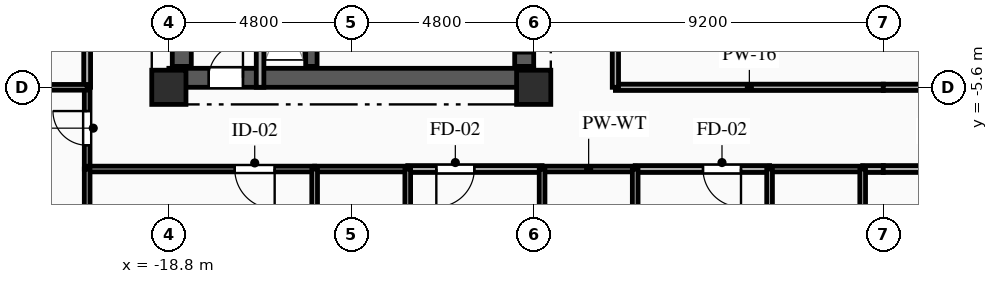
"""IFC4 building model, lengths in metres.
Left out: names, types, materials, properties, quantities, classifications, styles, units other than length and angle.
Written with IfcOpenShell. Run it as: python <this file> out.ifc"""

import sys

from ifc_helpers import new_model, si_unit, direction, frame, frame_2d, origin, origin_2d, place, context, subcontext, project, spatial, rectangle, extrude, element, fill, save


model = new_model("IFC4")
c1 = context("Model", 3, precision=1e-05, world=origin(), true_north=direction((0.0, 1.0)))
c2 = subcontext(c1, "Body", "Model", "MODEL_VIEW")
j1 = project(units=[si_unit("LENGTHUNIT", "METRE"), si_unit("PLANEANGLEUNIT", "RADIAN")], contexts=[c1])
p1 = place(None, origin())
s1 = spatial("IfcSite", under=j1, at=p1, CompositionType="ELEMENT")
p2 = place(p1, origin())
s2 = spatial("IfcBuilding", under=s1, at=p2, CompositionType="ELEMENT")
p3 = place(p2, frame((0.0, 0.0, 154.45)))
s3 = spatial("IfcBuildingStorey", under=s2, at=p3, CompositionType="ELEMENT", Elevation=154.45)
for number, where, z_axis, x_axis in (
    (1, (-18.8, -5.6, 0.0), (0.0, 0.0, 1.0), (1.0, 0.0, 0.0)),
    (2, (-9.2, -5.6, 0.0), (0.0, 0.0, 1.0), (1.0, 0.0, 0.0)),
):
    element("IfcColumn", number, at=place(p3, frame(where, z_axis=z_axis, x_axis=x_axis)), inside=s3, PredefinedType="COLUMN", context=c2, shape_type="SweptSolid", body=[
        extrude(rectangle(XDim=0.9, YDim=0.9, at=origin_2d()), origin(), (0.0, 0.0, 1.0), 3.35),
    ])
p4 = place(p3, frame((-18.8, -5.35, 0.0), z_axis=(0.0, 0.0, 1.0), x_axis=(1.0, 0.0, 0.0)))
e3 = element("IfcWall", 3, at=p4, inside=s3, PredefinedType="SHEAR", context=c2, shape_type="SweptSolid", body=[
    extrude(rectangle(XDim=9.6, YDim=0.5, at=frame_2d((4.8, 0.0))), origin(), (0.0, 0.0, 1.0), 3.04),
])
p5 = place(p4, frame((1.05, 0.0, 0.0)))
e4 = element("IfcOpeningElement", 4, at=p5, cuts=e3, PredefinedType="OPENING", context=c2, shape_type="SweptSolid", body=[
    extrude(rectangle(XDim=0.9, YDim=2.1, at=frame_2d((0.45, 1.05))), frame((0.0, 0.26, 0.0), z_axis=(0.0, -1.0, 0.0), x_axis=(1.0, 0.0, 0.0)), (0.0, 0.0, 1.0), 0.52),
])
p6 = place(p3, frame((-18.46, -5.05, 0.0), z_axis=(0.0, 0.0, 1.0), x_axis=(0.0, 1.0, 0.0)))
e5 = element("IfcWall", 5, at=p6, inside=s3, PredefinedType="SHEAR", context=c2, shape_type="SweptSolid", body=[
    extrude(rectangle(XDim=10.1, YDim=0.5, at=frame_2d((5.05, 0.0))), origin(), (0.0, 0.0, 1.0), 3.04),
])
p7 = place(p3, frame((-9.45, -5.05, 0.0), z_axis=(0.0, 0.0, 1.0), x_axis=(0.0, 1.0, 0.0)))
e6 = element("IfcWall", 6, at=p7, inside=s3, PredefinedType="SHEAR", context=c2, shape_type="SweptSolid", body=[
    extrude(rectangle(XDim=10.1, YDim=0.5, at=frame_2d((5.05, 0.0))), origin(), (0.0, 0.0, 1.0), 3.04),
])
p8 = place(p7, frame((7.15, 0.0, 0.0)))
e7 = element("IfcOpeningElement", 7, at=p8, cuts=e6, PredefinedType="OPENING", context=c2, shape_type="SweptSolid", body=[
    extrude(rectangle(XDim=0.9, YDim=2.1, at=frame_2d((0.45, 1.05))), frame((0.0, 0.26, 0.0), z_axis=(0.0, -1.0, 0.0), x_axis=(1.0, 0.0, 0.0)), (0.0, 0.0, 1.0), 0.52),
])
p9 = place(p7, frame((2.4, 0.0, 0.0)))
e8 = element("IfcOpeningElement", 8, at=p9, cuts=e6, PredefinedType="OPENING", context=c2, shape_type="SweptSolid", body=[
    extrude(rectangle(XDim=1.2, YDim=2.15, at=frame_2d((0.6, 1.075))), frame((0.0, 0.26, 0.0), z_axis=(0.0, -1.0, 0.0), x_axis=(1.0, 0.0, 0.0)), (0.0, 0.0, 1.0), 0.52),
])
p10 = place(p7, frame((0.35, 0.0, 0.0)))
e9 = element("IfcOpeningElement", 9, at=p10, cuts=e6, PredefinedType="OPENING", context=c2, shape_type="SweptSolid", body=[
    extrude(rectangle(XDim=0.9, YDim=2.1, at=frame_2d((0.45, 1.05))), frame((0.0, 0.26, 0.0), z_axis=(0.0, -1.0, 0.0), x_axis=(1.0, 0.0, 0.0)), (0.0, 0.0, 1.0), 0.52),
])
p11 = place(p7, frame((5.0, 0.0, 0.0)))
e10 = element("IfcOpeningElement", 10, at=p11, cuts=e6, PredefinedType="OPENING", context=c2, shape_type="SweptSolid", body=[
    extrude(rectangle(XDim=0.9, YDim=2.1, at=frame_2d((0.45, 1.05))), frame((0.0, 0.26, 0.0), z_axis=(0.0, -1.0, 0.0), x_axis=(1.0, 0.0, 0.0)), (0.0, 0.0, 1.0), 0.52),
])
p12 = place(p3, frame((-15.05, -5.05, 0.0), z_axis=(0.0, 0.0, 1.0), x_axis=(0.0, 1.0, 0.0)))
e11 = element("IfcWall", 11, at=p12, inside=s3, PredefinedType="SHEAR", context=c2, shape_type="SweptSolid", body=[
    extrude(rectangle(XDim=10.1, YDim=0.3, at=frame_2d((5.05, 0.0))), origin(), (0.0, 0.0, 1.0), 3.04),
])
p13 = place(p3, frame((-16.4, -5.6, 0.0), z_axis=(0.0, 0.0, 1.0), x_axis=(0.0, 1.0, 0.0)))
e12 = element("IfcWall", 12, at=p13, inside=s3, PredefinedType="PARTITIONING", context=c2, shape_type="SweptSolid", body=[
    extrude(rectangle(XDim=3.49, YDim=0.2, at=frame_2d((1.745, 0.0))), origin(), (0.0, 0.0, 1.0), 3.04),
])
p14 = place(p3, frame((-20.95, -7.75, 0.0), z_axis=(0.0, 0.0, 1.0), x_axis=(0.0, 1.0, 0.0)))
e13 = element("IfcWall", 13, at=p14, inside=s3, PredefinedType="PARTITIONING", context=c2, shape_type="SweptSolid", body=[
    extrude(rectangle(XDim=2.15, YDim=0.15, at=frame_2d((1.075, 0.0))), origin(), (0.0, 0.0, 1.0), 3.04),
])
p15 = place(p14, frame((0.625, 0.0, 0.0)))
e14 = element("IfcOpeningElement", 14, at=p15, cuts=e13, PredefinedType="OPENING", context=c2, shape_type="SweptSolid", body=[
    extrude(rectangle(XDim=0.9, YDim=2.1, at=frame_2d((0.45, 1.05))), frame((0.0, 0.085, 0.0), z_axis=(0.0, -1.0, 0.0), x_axis=(1.0, 0.0, 0.0)), (0.0, 0.0, 1.0), 0.17),
])
p16 = place(p3, frame((-14.964, -7.75, 0.0), z_axis=(0.0, 0.0, 1.0), x_axis=(-1.0, 0.0, 0.0)))
e15 = element("IfcWall", 15, at=p16, inside=s3, PredefinedType="PARTITIONING", context=c2, shape_type="SweptSolid", body=[
    extrude(rectangle(XDim=5.986, YDim=0.15, at=frame_2d((2.993, 0.0))), origin(), (0.0, 0.0, 1.0), 3.04),
])
p17 = place(p16, frame((1.052, 0.0, 0.0)))
e16 = element("IfcOpeningElement", 16, at=p17, cuts=e15, PredefinedType="OPENING", context=c2, shape_type="SweptSolid", body=[
    extrude(rectangle(XDim=1.05, YDim=2.15, at=frame_2d((0.525, 1.075))), frame((0.0, 0.085, 0.0), z_axis=(0.0, -1.0, 0.0), x_axis=(1.0, 0.0, 0.0)), (0.0, 0.0, 1.0), 0.17),
])
p18 = place(p3, frame((-8.979, -7.75, 0.0), z_axis=(0.0, 0.0, 1.0), x_axis=(-1.0, 0.0, 0.0)))
e17 = element("IfcWall", 17, at=p18, inside=s3, PredefinedType="PARTITIONING", context=c2, shape_type="SweptSolid", body=[
    extrude(rectangle(XDim=3.535, YDim=0.18, at=frame_2d((1.768, 0.0))), origin(), (0.0, 0.0, 1.0), 3.04),
])
p19 = place(p18, frame((1.783, 0.0, 0.0)))
e18 = element("IfcOpeningElement", 18, at=p19, cuts=e17, PredefinedType="OPENING", context=c2, shape_type="SweptSolid", body=[
    extrude(rectangle(XDim=1.0, YDim=2.15, at=frame_2d((0.5, 1.075))), frame((0.0, 0.1, 0.0), z_axis=(0.0, -1.0, 0.0), x_axis=(1.0, 0.0, 0.0)), (0.0, 0.0, 1.0), 0.2),
])
p20 = place(p3, frame((-12.514, -7.75, 0.0), z_axis=(0.0, 0.0, 1.0), x_axis=(-1.0, 0.0, 0.0)))
e19 = element("IfcWall", 19, at=p20, inside=s3, PredefinedType="PLUMBINGWALL", context=c2, shape_type="SweptSolid", body=[
    extrude(rectangle(XDim=2.45, YDim=0.15, at=frame_2d((1.225, 0.0))), origin(), (0.0, 0.0, 1.0), 3.04),
])
p21 = place(p3, frame((-2.993, -7.75, 0.0), z_axis=(0.0, 0.0, 1.0), x_axis=(-1.0, 0.0, 0.0)))
e20 = element("IfcWall", 20, at=p21, inside=s3, PredefinedType="PARTITIONING", context=c2, shape_type="SweptSolid", body=[
    extrude(rectangle(XDim=3.536, YDim=0.18, at=frame_2d((1.768, 0.0))), origin(), (0.0, 0.0, 1.0), 3.04),
])
p22 = place(p21, frame((0.752, 0.0, 0.0)))
e21 = element("IfcOpeningElement", 21, at=p22, cuts=e20, PredefinedType="OPENING", context=c2, shape_type="SweptSolid", body=[
    extrude(rectangle(XDim=1.0, YDim=2.15, at=frame_2d((0.5, 1.075))), frame((0.0, 0.1, 0.0), z_axis=(0.0, -1.0, 0.0), x_axis=(1.0, 0.0, 0.0)), (0.0, 0.0, 1.0), 0.2),
])
p23 = place(p3, frame((-6.529, -7.75, 0.0), z_axis=(0.0, 0.0, 1.0), x_axis=(-1.0, 0.0, 0.0)))
e22 = element("IfcWall", 22, at=p23, inside=s3, PredefinedType="PLUMBINGWALL", context=c2, shape_type="SweptSolid", body=[
    extrude(rectangle(XDim=2.45, YDim=0.15, at=frame_2d((1.225, 0.0))), origin(), (0.0, 0.0, 1.0), 3.04),
])
p24 = place(p3, frame((0.0, -7.75, 0.0), z_axis=(0.0, 0.0, 1.0), x_axis=(-1.0, 0.0, 0.0)))
e23 = element("IfcWall", 23, at=p24, inside=s3, PredefinedType="PARTITIONING", context=c2, shape_type="SweptSolid", body=[
    extrude(rectangle(XDim=0.543, YDim=0.18, at=frame_2d((0.271, 0.0))), origin(), (0.0, 0.0, 1.0), 3.04),
])
p25 = place(p3, frame((-0.543, -7.75, 0.0), z_axis=(0.0, 0.0, 1.0), x_axis=(-1.0, 0.0, 0.0)))
e24 = element("IfcWall", 24, at=p25, inside=s3, PredefinedType="PLUMBINGWALL", context=c2, shape_type="SweptSolid", body=[
    extrude(rectangle(XDim=2.45, YDim=0.15, at=frame_2d((1.225, 0.0))), origin(), (0.0, 0.0, 1.0), 3.04),
])
p26 = place(p3, frame((-7.05, -5.6, 0.0), z_axis=(0.0, 0.0, 1.0), x_axis=(1.0, 0.0, 0.0)))
e25 = element("IfcWall", 25, at=p26, inside=s3, PredefinedType="PARTITIONING", context=c2, shape_type="SweptSolid", body=[
    extrude(rectangle(XDim=7.05, YDim=0.165, at=frame_2d((3.525, 0.0))), origin(), (0.0, 0.0, 1.0), 2.525),
])
p27 = place(p3, frame((2.993, -7.75, 0.0), z_axis=(0.0, 0.0, 1.0), x_axis=(-1.0, 0.0, 0.0)))
e26 = element("IfcWall", 26, at=p27, inside=s3, PredefinedType="PARTITIONING", context=c2, shape_type="SweptSolid", body=[
    extrude(rectangle(XDim=2.993, YDim=0.18, at=frame_2d((1.497, 0.0))), origin(), (0.0, 0.0, 1.0), 3.04),
])
p28 = place(p27, frame((0.892, 0.0, 0.0)))
e27 = element("IfcOpeningElement", 27, at=p28, cuts=e26, PredefinedType="OPENING", context=c2, shape_type="SweptSolid", body=[
    extrude(rectangle(XDim=1.0, YDim=2.15, at=frame_2d((0.5, 1.075))), frame((0.0, 0.1, 0.0), z_axis=(0.0, -1.0, 0.0), x_axis=(1.0, 0.0, 0.0)), (0.0, 0.0, 1.0), 0.2),
])
p29 = place(p3, frame((0.0, -5.6, 0.0), z_axis=(0.0, 0.0, 1.0), x_axis=(1.0, 0.0, 0.0)))
e28 = element("IfcWall", 28, at=p29, inside=s3, PredefinedType="PARTITIONING", context=c2, shape_type="SweptSolid", body=[
    extrude(rectangle(XDim=7.05, YDim=0.165, at=frame_2d((3.525, 0.0))), origin(), (0.0, 0.0, 1.0), 2.525),
])
p30 = place(p3, frame((-20.95, -5.6, 0.0), z_axis=(0.0, 0.0, 1.0), x_axis=(0.0, 1.0, 0.0)))
e29 = element("IfcWall", 29, at=p30, inside=s3, PredefinedType="PARTITIONING", context=c2, shape_type="SweptSolid", body=[
    extrude(rectangle(XDim=14.1, YDim=0.18, at=frame_2d((7.05, 0.0))), origin(), (0.0, 0.0, 1.0), 3.04),
])
p31 = place(p30, frame((5.058, 0.0, 0.0)))
e30 = element("IfcOpeningElement", 30, at=p31, cuts=e29, PredefinedType="OPENING", context=c2, shape_type="SweptSolid", body=[
    extrude(rectangle(XDim=1.0, YDim=2.15, at=frame_2d((0.5, 1.075))), frame((0.0, 0.1, 0.0), z_axis=(0.0, -1.0, 0.0), x_axis=(1.0, 0.0, 0.0)), (0.0, 0.0, 1.0), 0.2),
])
p32 = place(p3, frame((-7.05, -2.95, 0.0), z_axis=(0.0, 0.0, 1.0), x_axis=(0.0, -1.0, 0.0)))
e31 = element("IfcWall", 31, at=p32, inside=s3, PredefinedType="PARTITIONING", context=c2, shape_type="SweptSolid", body=[
    extrude(rectangle(XDim=2.65, YDim=0.165, at=frame_2d((1.325, 0.0))), origin(), (0.0, 0.0, 1.0), 3.04),
])
p33 = place(p3, frame((-20.95, -5.6, 0.0), z_axis=(0.0, 0.0, 1.0), x_axis=(-1.0, 0.0, 0.0)))
e32 = element("IfcWall", 32, at=p33, inside=s3, PredefinedType="PARTITIONING", context=c2, shape_type="SweptSolid", body=[
    extrude(rectangle(XDim=2.65, YDim=0.15, at=frame_2d((1.325, 0.0))), origin(), (0.0, 0.0, 1.0), 3.04),
])
p34 = place(p33, frame((0.965, 0.0, 0.0)))
e33 = element("IfcOpeningElement", 33, at=p34, cuts=e32, PredefinedType="OPENING", context=c2, shape_type="SweptSolid", body=[
    extrude(rectangle(XDim=1.05, YDim=2.15, at=frame_2d((0.525, 1.075))), frame((0.0, 0.085, 0.0), z_axis=(0.0, -1.0, 0.0), x_axis=(1.0, 0.0, 0.0)), (0.0, 0.0, 1.0), 0.17),
])
p35 = place(p3, frame((-20.95, -7.75, 0.0), z_axis=(0.0, 0.0, 1.0), x_axis=(0.0, -1.0, 0.0)))
e34 = element("IfcWall", 34, at=p35, inside=s3, PredefinedType="PARTITIONING", context=c2, shape_type="SweptSolid", body=[
    extrude(rectangle(XDim=7.85, YDim=0.15, at=frame_2d((3.925, 0.0))), origin(), (0.0, 0.0, 1.0), 3.04),
])
for number, where, z_axis, x_axis in (
    (35, (-14.964, -7.75, 0.0), (0.0, 0.0, 1.0), (0.0, -1.0, 0.0)),
    (36, (-12.514, -9.9, 0.0), (0.0, 0.0, 1.0), (0.0, 1.0, 0.0)),
):
    element("IfcWall", number, at=place(p3, frame(where, z_axis=z_axis, x_axis=x_axis)), inside=s3, PredefinedType="PLUMBINGWALL", context=c2, shape_type="SweptSolid", body=[
        extrude(rectangle(XDim=2.15, YDim=0.15, at=frame_2d((1.075, 0.0))), origin(), (0.0, 0.0, 1.0), 3.04),
    ])
p36 = place(p3, frame((-8.979, -7.75, 0.0), z_axis=(0.0, 0.0, 1.0), x_axis=(0.0, -1.0, 0.0)))
e37 = element("IfcWall", 37, at=p36, inside=s3, PredefinedType="PLUMBINGWALL", context=c2, shape_type="SweptSolid", body=[
    extrude(rectangle(XDim=2.15, YDim=0.15, at=frame_2d((1.075, 0.0))), origin(), (0.0, 0.0, 1.0), 2.525),
])
for number, where, z_axis, x_axis in (
    (38, (-6.529, -9.9, 0.0), (0.0, 0.0, 1.0), (0.0, 1.0, 0.0)),
    (39, (-2.993, -7.75, 0.0), (0.0, 0.0, 1.0), (0.0, -1.0, 0.0)),
    (40, (-0.543, -9.9, 0.0), (0.0, 0.0, 1.0), (0.0, 1.0, 0.0)),
):
    element("IfcWall", number, at=place(p3, frame(where, z_axis=z_axis, x_axis=x_axis)), inside=s3, PredefinedType="PLUMBINGWALL", context=c2, shape_type="SweptSolid", body=[
        extrude(rectangle(XDim=2.15, YDim=0.15, at=frame_2d((1.075, 0.0))), origin(), (0.0, 0.0, 1.0), 3.04),
    ])
p37 = place(p5, origin())
e41 = element("IfcDoor", 41, at=p37, inside=s3, OperationType="SINGLE_SWING_RIGHT", PredefinedType="DOOR", context=c2, shape_type="SweptSolid", body=[
    extrude(rectangle(XDim=0.9, YDim=2.1, at=frame_2d((0.45, 1.05))), frame((0.0, 0.025, 0.0), z_axis=(0.0, -1.0, 0.0), x_axis=(1.0, 0.0, 0.0)), (0.0, 0.0, 1.0), 0.05),
])
fill(e4, e41)
p38 = place(p10, origin())
e42 = element("IfcDoor", 42, at=p38, inside=s3, OperationType="SINGLE_SWING_RIGHT", PredefinedType="DOOR", context=c2, shape_type="SweptSolid", body=[
    extrude(rectangle(XDim=0.9, YDim=2.1, at=frame_2d((0.45, 1.05))), frame((0.0, 0.025, 0.0), z_axis=(0.0, -1.0, 0.0), x_axis=(1.0, 0.0, 0.0)), (0.0, 0.0, 1.0), 0.05),
])
fill(e9, e42)
p39 = place(p15, origin())
e43 = element("IfcDoor", 43, at=p39, inside=s3, OperationType="SINGLE_SWING_RIGHT", PredefinedType="DOOR", context=c2, shape_type="SweptSolid", body=[
    extrude(rectangle(XDim=0.9, YDim=2.1, at=frame_2d((0.45, 1.05))), frame((0.0, 0.025, 0.0), z_axis=(0.0, -1.0, 0.0), x_axis=(1.0, 0.0, 0.0)), (0.0, 0.0, 1.0), 0.05),
])
fill(e14, e43)
p40 = place(p17, origin())
e44 = element("IfcDoor", 44, at=p40, inside=s3, OperationType="SINGLE_SWING_LEFT", PredefinedType="DOOR", context=c2, shape_type="SweptSolid", body=[
    extrude(rectangle(XDim=1.05, YDim=2.15, at=frame_2d((0.525, 1.075))), frame((0.0, 0.025, 0.0), z_axis=(0.0, -1.0, 0.0), x_axis=(1.0, 0.0, 0.0)), (0.0, 0.0, 1.0), 0.05),
])
fill(e16, e44)
p41 = place(p19, origin())
e45 = element("IfcDoor", 45, at=p41, inside=s3, OperationType="SINGLE_SWING_RIGHT", PredefinedType="DOOR", context=c2, shape_type="SweptSolid", body=[
    extrude(rectangle(XDim=1.0, YDim=2.15, at=frame_2d((0.5, 1.075))), frame((0.0, 0.025, 0.0), z_axis=(0.0, -1.0, 0.0), x_axis=(1.0, 0.0, 0.0)), (0.0, 0.0, 1.0), 0.05),
])
fill(e18, e45)
p42 = place(p22, origin())
e46 = element("IfcDoor", 46, at=p42, inside=s3, OperationType="SINGLE_SWING_LEFT", PredefinedType="DOOR", context=c2, shape_type="SweptSolid", body=[
    extrude(rectangle(XDim=1.0, YDim=2.15, at=frame_2d((0.5, 1.075))), frame((0.0, 0.025, 0.0), z_axis=(0.0, -1.0, 0.0), x_axis=(1.0, 0.0, 0.0)), (0.0, 0.0, 1.0), 0.05),
])
fill(e21, e46)
save(model, sys.argv[1])
